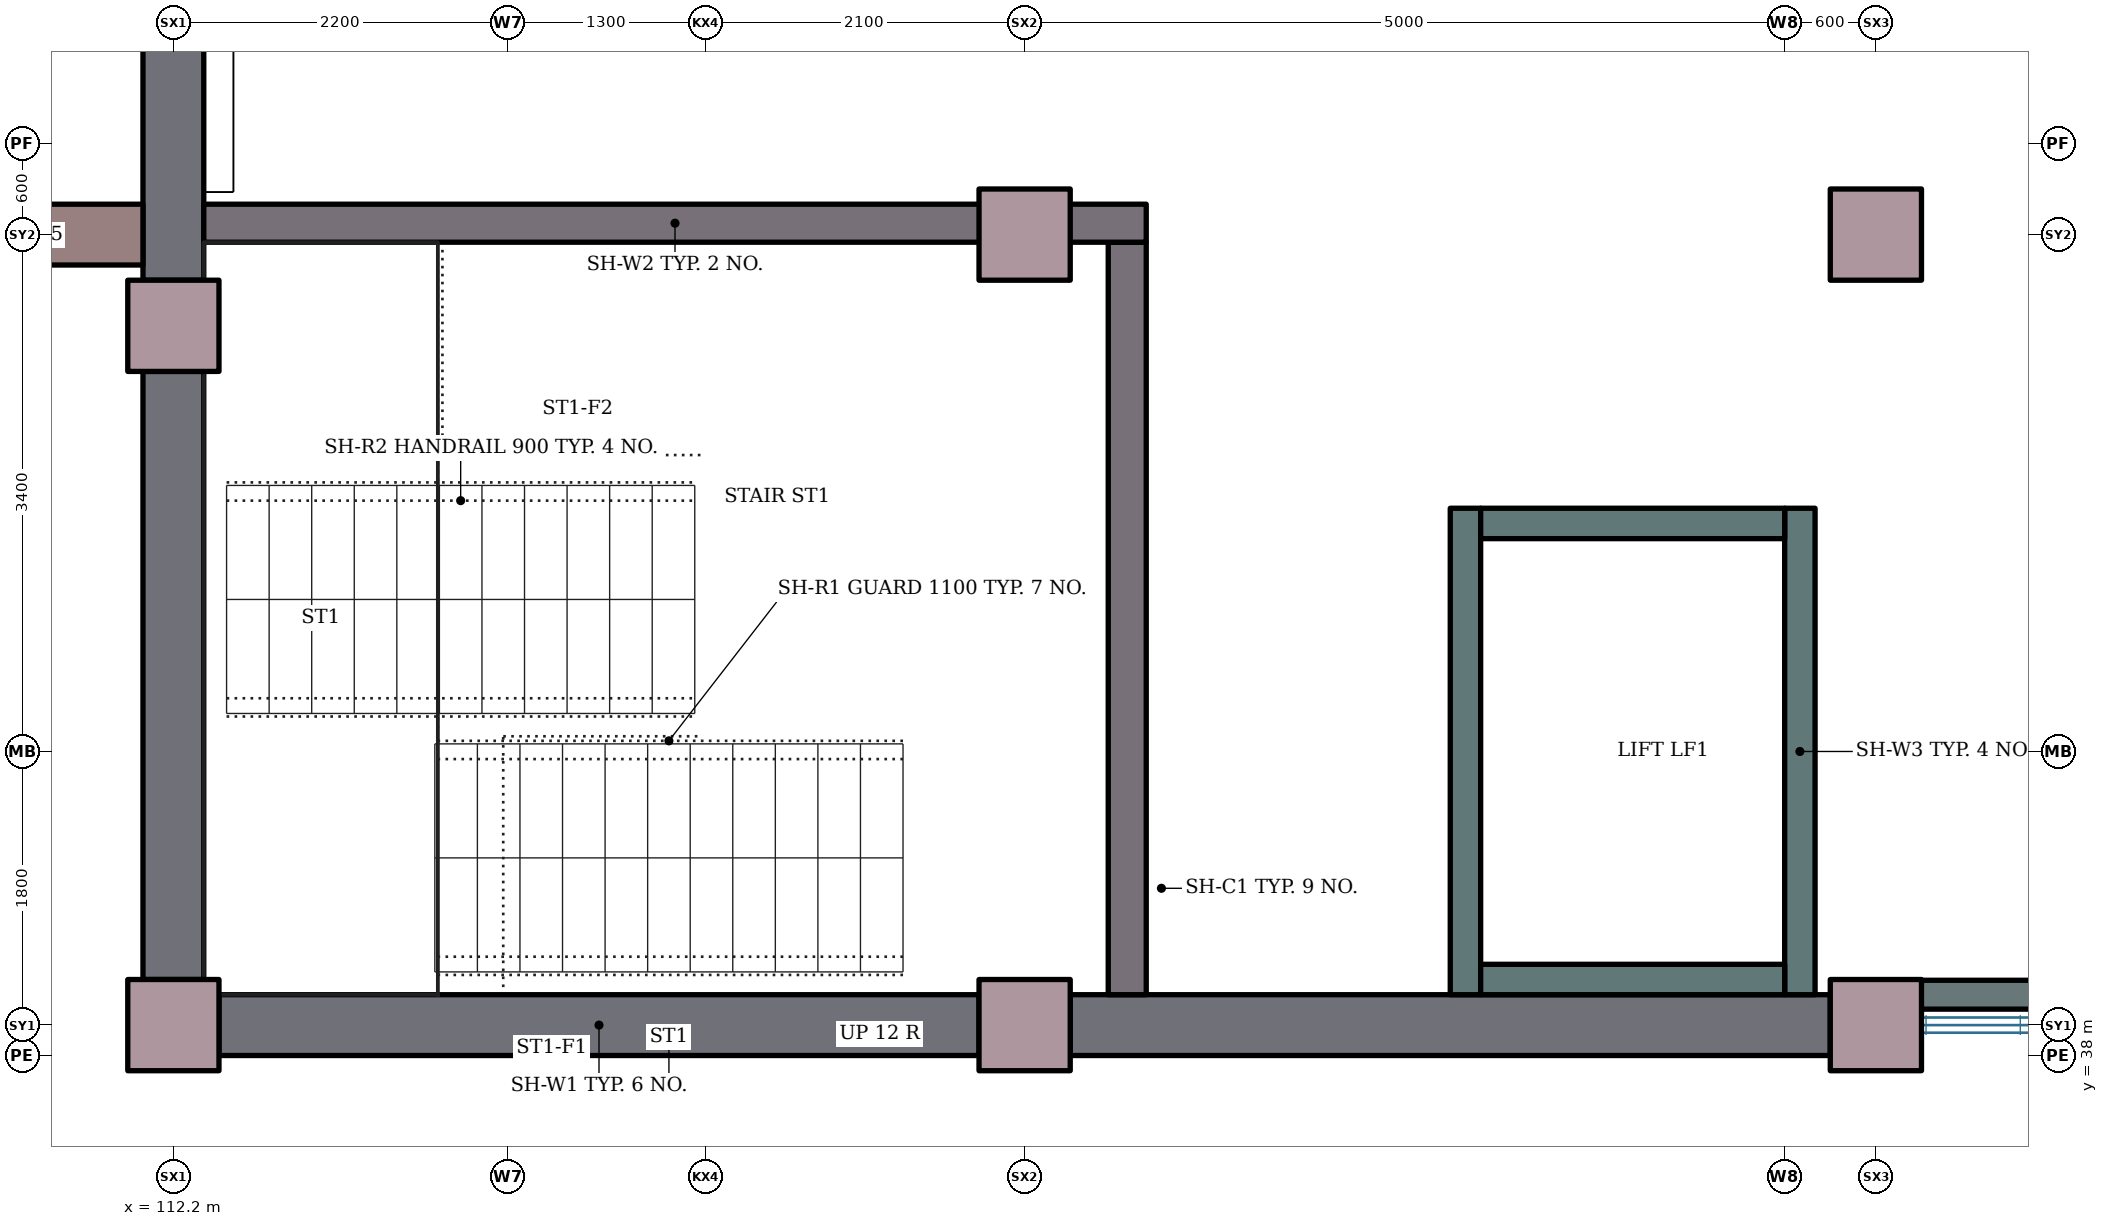
"""IFC4 building model, lengths in metres.
Left out: names, types, materials, properties, quantities, classifications, styles, units other than length and angle.
Written with IfcOpenShell. Run it as: python <this file> out.ifc"""

import sys

from ifc_helpers import new_model, si_unit, direction, frame, frame_2d, origin, origin_2d, place, context, subcontext, project, spatial, rectangle, extrude, element, fill, save


model = new_model("IFC4")
c1 = context("Model", 3, precision=1e-05, world=origin(), true_north=direction((0.0, 1.0)))
c2 = subcontext(c1, "Body", "Model", "MODEL_VIEW")
j1 = project(units=[si_unit("LENGTHUNIT", "METRE"), si_unit("PLANEANGLEUNIT", "RADIAN")], contexts=[c1])
p1 = place(None, origin())
s1 = spatial("IfcSite", under=j1, at=p1, CompositionType="ELEMENT")
p2 = place(p1, origin())
s2 = spatial("IfcBuilding", under=s1, at=p2, CompositionType="ELEMENT")
p3 = place(p2, frame((0.0, 0.0, 4.2)))
s3 = spatial("IfcBuildingStorey", under=s2, at=p3, CompositionType="ELEMENT", Elevation=4.2)
for number, where, z_axis, x_axis in (
    (1, (112.2, 38.2, 0.0), (0.0, 0.0, 1.0), (1.0, 0.0, 0.0)),
    (2, (117.8, 38.2, 0.0), (0.0, 0.0, 1.0), (1.0, 0.0, 0.0)),
    (3, (123.4, 38.2, 0.0), (0.0, 0.0, 1.0), (1.0, 0.0, 0.0)),
    (4, (112.2, 42.8, 0.0), (0.0, 0.0, 1.0), (1.0, 0.0, 0.0)),
    (5, (117.8, 43.4, 0.0), (0.0, 0.0, 1.0), (1.0, 0.0, 0.0)),
    (6, (123.4, 43.4, 0.0), (0.0, 0.0, 1.0), (1.0, 0.0, 0.0)),
):
    element("IfcColumn", number, at=place(p3, frame(where, z_axis=z_axis, x_axis=x_axis)), inside=s3, PredefinedType="COLUMN", context=c2, shape_type="SweptSolid", body=[
        extrude(rectangle(XDim=0.6, YDim=0.6, at=origin_2d()), origin(), (0.0, 0.0, 1.0), 4.2),
    ])
p4 = place(p3, frame((117.5, 38.2, 0.0), z_axis=(0.0, 0.0, 1.0), x_axis=(-1.0, 0.0, 0.0)))
e7 = element("IfcWall", 7, at=p4, inside=s3, PredefinedType="SOLIDWALL", context=c2, shape_type="SweptSolid", body=[
    extrude(rectangle(XDim=5.0, YDim=0.4, at=frame_2d((2.5, 0.0))), origin(), (0.0, 0.0, 1.0), 4.2),
])
p5 = place(p3, frame((123.1, 38.2, 0.0), z_axis=(0.0, 0.0, 1.0), x_axis=(-1.0, 0.0, 0.0)))
e8 = element("IfcWall", 8, at=p5, inside=s3, PredefinedType="SOLIDWALL", context=c2, shape_type="SweptSolid", body=[
    extrude(rectangle(XDim=5.0, YDim=0.4, at=frame_2d((2.5, 0.0))), origin(), (0.0, 0.0, 1.0), 4.2),
])
p6 = place(p5, frame((2.65, 0.0, 1.0)))
e9 = element("IfcOpeningElement", 9, at=p6, cuts=e8, PredefinedType="OPENING", context=c2, shape_type="SweptSolid", body=[
    extrude(rectangle(XDim=1.7, YDim=1.8, at=frame_2d((0.85, 0.9))), frame((0.0, 0.21, 0.0), z_axis=(0.0, -1.0, 0.0), x_axis=(1.0, 0.0, 0.0)), (0.0, 0.0, 1.0), 0.42),
])
p7 = place(p3, frame((112.2, 38.5, 0.0), z_axis=(0.0, 0.0, 1.0), x_axis=(0.0, 1.0, 0.0)))
e10 = element("IfcWall", 10, at=p7, inside=s3, PredefinedType="SOLIDWALL", context=c2, shape_type="SweptSolid", body=[
    extrude(rectangle(XDim=4.0, YDim=0.4, at=frame_2d((2.0, 0.0))), origin(), (0.0, 0.0, 1.0), 4.2),
])
p8 = place(p7, frame((1.55, 0.0, 0.9)))
e11 = element("IfcOpeningElement", 11, at=p8, cuts=e10, PredefinedType="OPENING", context=c2, shape_type="SweptSolid", body=[
    extrude(rectangle(XDim=0.9, YDim=1.5, at=frame_2d((0.45, 0.75))), frame((0.0, 0.21, 0.0), z_axis=(0.0, -1.0, 0.0), x_axis=(1.0, 0.0, 0.0)), (0.0, 0.0, 1.0), 0.42),
])
p9 = place(p3, frame((112.2, 43.1, 0.0), z_axis=(0.0, 0.0, 1.0), x_axis=(0.0, 1.0, 0.0)))
e12 = element("IfcWall", 12, at=p9, inside=s3, PredefinedType="SOLIDWALL", context=c2, shape_type="SweptSolid", body=[
    extrude(rectangle(XDim=4.0, YDim=0.4, at=frame_2d((2.0, 0.0))), origin(), (0.0, 0.0, 1.0), 4.2),
])
p10 = place(p9, frame((1.0, 0.0, 2.4)))
e13 = element("IfcOpeningElement", 13, at=p10, cuts=e12, PredefinedType="OPENING", context=c2, shape_type="SweptSolid", body=[
    extrude(rectangle(XDim=2.0, YDim=1.2, at=frame_2d((1.0, 0.6))), frame((0.0, 0.21, 0.0), z_axis=(0.0, -1.0, 0.0), x_axis=(1.0, 0.0, 0.0)), (0.0, 0.0, 1.0), 0.42),
])
p11 = place(p3, frame((118.475, 38.4, 0.0), z_axis=(0.0, 0.0, 1.0), x_axis=(0.0, 1.0, 0.0)))
e14 = element("IfcWall", 14, at=p11, inside=s3, PredefinedType="SHEAR", context=c2, shape_type="SweptSolid", body=[
    extrude(rectangle(XDim=4.95, YDim=0.25, at=frame_2d((2.475, 0.0))), origin(), (0.0, 0.0, 1.0), 4.2),
])
p12 = place(p11, frame((2.834, 0.0, 0.0)))
e15 = element("IfcOpeningElement", 15, at=p12, cuts=e14, PredefinedType="OPENING", context=c2, shape_type="SweptSolid", body=[
    extrude(rectangle(XDim=1.0, YDim=2.1, at=frame_2d((0.5, 1.05))), frame((0.0, 0.135, 0.0), z_axis=(0.0, -1.0, 0.0), x_axis=(1.0, 0.0, 0.0)), (0.0, 0.0, 1.0), 0.27),
])
p13 = place(p3, frame((112.4, 43.475, 0.0), z_axis=(0.0, 0.0, 1.0), x_axis=(1.0, 0.0, 0.0)))
e16 = element("IfcWall", 16, at=p13, inside=s3, PredefinedType="SHEAR", context=c2, shape_type="SweptSolid", body=[
    extrude(rectangle(XDim=6.2, YDim=0.25, at=frame_2d((3.1, 0.0))), origin(), (0.0, 0.0, 1.0), 4.2),
])
for number, where, z_axis, x_axis in (
    (17, (120.7, 38.4, 0.0), (0.0, 0.0, 1.0), (0.0, 1.0, 0.0)),
    (18, (122.9, 38.4, 0.0), (0.0, 0.0, 1.0), (0.0, 1.0, 0.0)),
):
    element("IfcWall", number, at=place(p3, frame(where, z_axis=z_axis, x_axis=x_axis)), inside=s3, PredefinedType="SHEAR", context=c2, shape_type="SweptSolid", body=[
        extrude(rectangle(XDim=3.2, YDim=0.2, at=frame_2d((1.6, 0.0))), origin(), (0.0, 0.0, 1.0), 4.2),
    ])
p14 = place(p3, frame((120.8, 38.5, 0.0), z_axis=(0.0, 0.0, 1.0), x_axis=(1.0, 0.0, 0.0)))
e19 = element("IfcWall", 19, at=p14, inside=s3, PredefinedType="SHEAR", context=c2, shape_type="SweptSolid", body=[
    extrude(rectangle(XDim=2.0, YDim=0.2, at=frame_2d((1.0, 0.0))), origin(), (0.0, 0.0, 1.0), 4.2),
])
p15 = place(p3, frame((120.8, 41.5, 0.0), z_axis=(0.0, 0.0, 1.0), x_axis=(1.0, 0.0, 0.0)))
e20 = element("IfcWall", 20, at=p15, inside=s3, PredefinedType="SHEAR", context=c2, shape_type="SweptSolid", body=[
    extrude(rectangle(XDim=2.0, YDim=0.2, at=frame_2d((1.0, 0.0))), origin(), (0.0, 0.0, 1.0), 4.2),
])
p16 = place(p15, frame((0.45, 0.0, 0.0)))
e21 = element("IfcOpeningElement", 21, at=p16, cuts=e20, PredefinedType="OPENING", context=c2, shape_type="SweptSolid", body=[
    extrude(rectangle(XDim=1.1, YDim=2.1, at=frame_2d((0.55, 1.05))), frame((0.0, 0.11, 0.0), z_axis=(0.0, -1.0, 0.0), x_axis=(1.0, 0.0, 0.0)), (0.0, 0.0, 1.0), 0.22),
])
p17 = place(p3, frame((110.3, 43.4, 0.0), z_axis=(0.0, 0.0, 1.0), x_axis=(1.0, 0.0, 0.0)))
e22 = element("IfcWall", 22, at=p17, inside=s3, PredefinedType="STANDARD", context=c2, shape_type="SweptSolid", body=[
    extrude(rectangle(XDim=1.7, YDim=0.4, at=frame_2d((0.85, 0.0))), origin(), (0.0, 0.0, 1.0), 4.2),
])
p18 = place(p3, frame((112.4, 43.02, 0.0), z_axis=(0.0, 0.0, 1.0), x_axis=(0.0, -1.0, 0.0)))
e23 = element("IfcWall", 23, at=p18, inside=s3, PredefinedType="PARTITIONING", context=c2, shape_type="SweptSolid", body=[
    extrude(rectangle(XDim=0.44, YDim=0.19, at=frame_2d((0.22, 0.0))), origin(), (0.0, 0.0, 1.0), 3.98),
])
p19 = place(p3, frame((112.5, 43.68, 0.0), z_axis=(0.0, 0.0, 1.0), x_axis=(0.0, 1.0, 0.0)))
e24 = element("IfcWall", 24, at=p19, inside=s3, PredefinedType="PARTITIONING", context=c2, shape_type="SweptSolid", body=[
    extrude(rectangle(XDim=18.52, YDim=0.19, at=frame_2d((9.26, 0.0))), origin(), (0.0, 0.0, 1.0), 3.98),
])
p20 = place(p3, frame((117.58, 38.4, 0.0), z_axis=(0.0, 0.0, 1.0), x_axis=(1.0, 0.0, 0.0)))
e25 = element("IfcWall", 25, at=p20, inside=s3, PredefinedType="PARTITIONING", context=c2, shape_type="SweptSolid", body=[
    extrude(rectangle(XDim=0.44, YDim=0.19, at=frame_2d((0.22, 0.0))), origin(), (0.0, 0.0, 1.0), 3.98),
])
p21 = place(p3, frame((124.92, 38.4, 0.0), z_axis=(0.0, 0.0, 1.0), x_axis=(-1.0, 0.0, 0.0)))
e26 = element("IfcWall", 26, at=p21, inside=s3, PredefinedType="PARTITIONING", context=c2, shape_type="SweptSolid", body=[
    extrude(rectangle(XDim=1.5, YDim=0.19, at=frame_2d((0.75, 0.0))), origin(), (0.0, 0.0, 1.0), 3.98),
])
p22 = place(p8, origin())
e27 = element("IfcWindow", 27, at=p22, inside=s3, PartitioningType="SINGLE_PANEL", PredefinedType="WINDOW", context=c2, shape_type="SweptSolid", body=[
    extrude(rectangle(XDim=0.9, YDim=1.5, at=frame_2d((0.45, 0.75))), frame((0.0, 0.03, 0.0), z_axis=(0.0, -1.0, 0.0), x_axis=(1.0, 0.0, 0.0)), (0.0, 0.0, 1.0), 0.06),
])
fill(e11, e27)
p23 = place(p10, origin())
e28 = element("IfcWindow", 28, at=p23, inside=s3, PartitioningType="SINGLE_PANEL", PredefinedType="WINDOW", context=c2, shape_type="SweptSolid", body=[
    extrude(rectangle(XDim=2.0, YDim=1.2, at=frame_2d((1.0, 0.6))), frame((0.0, 0.03, 0.0), z_axis=(0.0, -1.0, 0.0), x_axis=(1.0, 0.0, 0.0)), (0.0, 0.0, 1.0), 0.06),
])
fill(e13, e28)
p24 = place(p6, origin())
e29 = element("IfcWindow", 29, at=p24, inside=s3, PartitioningType="SINGLE_PANEL", PredefinedType="WINDOW", context=c2, shape_type="SweptSolid", body=[
    extrude(rectangle(XDim=1.7, YDim=1.8, at=frame_2d((0.85, 0.9))), frame((0.0, 0.03, 0.0), z_axis=(0.0, -1.0, 0.0), x_axis=(1.0, 0.0, 0.0)), (0.0, 0.0, 1.0), 0.06),
])
fill(e9, e29)
p25 = place(p16, origin())
e30 = element("IfcDoor", 30, at=p25, inside=s3, OperationType="SLIDING_TO_LEFT", PredefinedType="DOOR", context=c2, shape_type="SweptSolid", body=[
    extrude(rectangle(XDim=1.1, YDim=2.1, at=frame_2d((0.55, 1.05))), frame((0.0, 0.025, 0.0), z_axis=(0.0, -1.0, 0.0), x_axis=(1.0, 0.0, 0.0)), (0.0, 0.0, 1.0), 0.05),
])
fill(e21, e30)
p26 = place(p12, origin())
e31 = element("IfcDoor", 31, at=p26, inside=s3, OperationType="SINGLE_SWING_LEFT", PredefinedType="DOOR", context=c2, shape_type="SweptSolid", body=[
    extrude(rectangle(XDim=1.0, YDim=2.1, at=frame_2d((0.5, 1.05))), frame((0.0, 0.025, 0.0), z_axis=(0.0, -1.0, 0.0), x_axis=(1.0, 0.0, 0.0)), (0.0, 0.0, 1.0), 0.05),
])
fill(e15, e31)
save(model, sys.argv[1])
